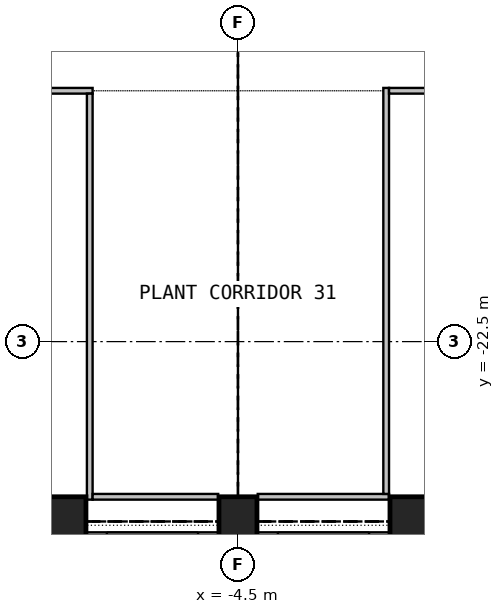
"""IFC4 building model, lengths in metres.
Left out: names, types, materials, properties, quantities, classifications, styles, units other than length and angle.
Written with IfcOpenShell. Run it as: python <this file> out.ifc"""

import sys

from ifc_helpers import new_model, si_unit, direction, frame, frame_2d, origin, origin_2d, place, context, subcontext, project, spatial, rectangle, extrude, element, fill, save


model = new_model("IFC4")
c1 = context("Model", 3, precision=1e-05, world=origin(), true_north=direction((0.0, 1.0)))
c2 = subcontext(c1, "Body", "Model", "MODEL_VIEW")
j1 = project(units=[si_unit("LENGTHUNIT", "METRE"), si_unit("PLANEANGLEUNIT", "RADIAN")], contexts=[c1])
p1 = place(None, origin())
s1 = spatial("IfcSite", under=j1, at=p1, CompositionType="ELEMENT")
p2 = place(p1, origin())
s2 = spatial("IfcBuilding", under=s1, at=p2, CompositionType="ELEMENT")
p3 = place(p2, frame((0.0, 0.0, 128.1)))
s3 = spatial("IfcBuildingStorey", under=s2, at=p3, CompositionType="ELEMENT", Elevation=128.1)
for number, where, z_axis, x_axis in (
    (1, (-9.0, -27.233, 0.0), (0.0, 0.0, 1.0), (1.0, 0.0, 0.0)),
    (2, (-4.5, -27.233, 0.0), (0.0, 0.0, 1.0), (1.0, 0.0, 0.0)),
    (3, (0.0, -27.233, 0.0), (0.0, 0.0, 1.0), (1.0, 0.0, 0.0)),
):
    element("IfcColumn", number, at=place(p3, frame(where, z_axis=z_axis, x_axis=x_axis)), inside=s3, PredefinedType="COLUMN", context=c2, shape_type="SweptSolid", body=[
        extrude(rectangle(XDim=1.0, YDim=1.3, at=origin_2d()), origin(), (0.0, 0.0, 1.0), 4.175),
    ])
p4 = place(p3, frame((-8.5, -27.578, 0.0), z_axis=(0.0, 0.0, 1.0), x_axis=(1.0, 0.0, 0.0)))
e4 = element("IfcWall", 4, at=p4, inside=s3, PredefinedType="SOLIDWALL", context=c2, shape_type="SweptSolid", body=[
    extrude(rectangle(XDim=3.499, YDim=0.12, at=frame_2d((1.75, 0.0))), origin(), (0.0, 0.0, 1.0), 4.175),
])
p5 = place(p4, frame((0.55, 0.0, 0.6)))
e5 = element("IfcOpeningElement", 5, at=p5, cuts=e4, PredefinedType="OPENING", context=c2, shape_type="SweptSolid", body=[
    extrude(rectangle(XDim=2.4, YDim=3.0, at=frame_2d((1.2, 1.5))), frame((0.0, 0.07, 0.0), z_axis=(0.0, -1.0, 0.0), x_axis=(1.0, 0.0, 0.0)), (0.0, 0.0, 1.0), 0.14),
])
p6 = place(p3, frame((-4.0, -27.578, 0.0), z_axis=(0.0, 0.0, 1.0), x_axis=(1.0, 0.0, 0.0)))
e6 = element("IfcWall", 6, at=p6, inside=s3, PredefinedType="SOLIDWALL", context=c2, shape_type="SweptSolid", body=[
    extrude(rectangle(XDim=3.499, YDim=0.12, at=frame_2d((1.75, 0.0))), origin(), (0.0, 0.0, 1.0), 4.175),
])
p7 = place(p6, frame((0.55, 0.0, 0.6)))
e7 = element("IfcOpeningElement", 7, at=p7, cuts=e6, PredefinedType="OPENING", context=c2, shape_type="SweptSolid", body=[
    extrude(rectangle(XDim=2.4, YDim=3.0, at=frame_2d((1.2, 1.5))), frame((0.0, 0.07, 0.0), z_axis=(0.0, -1.0, 0.0), x_axis=(1.0, 0.0, 0.0)), (0.0, 0.0, 1.0), 0.14),
])
p8 = place(p3, frame((-18.075, -15.9, 0.0), z_axis=(0.0, 0.0, 1.0), x_axis=(1.0, 0.0, 0.0)))
e8 = element("IfcWall", 8, at=p8, inside=s3, PredefinedType="PARTITIONING", context=c2, shape_type="SweptSolid", body=[
    extrude(rectangle(XDim=9.75, YDim=0.15, at=frame_2d((4.875, 0.0))), origin(), (0.0, 0.0, 1.0), 4.175),
])
p9 = place(p3, frame((-8.4, -26.658, 0.0), z_axis=(0.0, 0.0, 1.0), x_axis=(0.0, 1.0, 0.0)))
e9 = element("IfcWall", 9, at=p9, inside=s3, PredefinedType="PARTITIONING", context=c2, shape_type="SweptSolid", body=[
    extrude(rectangle(XDim=10.683, YDim=0.15, at=frame_2d((5.341, 0.0))), origin(), (0.0, 0.0, 1.0), 4.175),
])
p10 = place(p3, frame((-0.525, -26.583, 0.0), z_axis=(0.0, 0.0, 1.0), x_axis=(-1.0, 0.0, 0.0)))
e10 = element("IfcWall", 10, at=p10, inside=s3, PredefinedType="PARTITIONING", context=c2, shape_type="SweptSolid", body=[
    extrude(rectangle(XDim=3.455, YDim=0.15, at=frame_2d((1.728, 0.0))), origin(), (0.0, 0.0, 1.0), 4.175),
])
p11 = place(p3, frame((-5.02, -26.583, 0.0), z_axis=(0.0, 0.0, 1.0), x_axis=(-1.0, 0.0, 0.0)))
e11 = element("IfcWall", 11, at=p11, inside=s3, PredefinedType="PARTITIONING", context=c2, shape_type="SweptSolid", body=[
    extrude(rectangle(XDim=3.305, YDim=0.15, at=frame_2d((1.652, 0.0))), origin(), (0.0, 0.0, 1.0), 4.175),
])
p12 = place(p3, frame((-0.6, -15.825, 0.0), z_axis=(0.0, 0.0, 1.0), x_axis=(0.0, -1.0, 0.0)))
e12 = element("IfcWall", 12, at=p12, inside=s3, PredefinedType="PARTITIONING", context=c2, shape_type="SweptSolid", body=[
    extrude(rectangle(XDim=10.683, YDim=0.15, at=frame_2d((5.342, 0.0))), origin(), (0.0, 0.0, 1.0), 4.175),
])
p13 = place(p3, frame((-0.525, -15.9, 0.0), z_axis=(0.0, 0.0, 1.0), x_axis=(1.0, 0.0, 0.0)))
e13 = element("IfcWall", 13, at=p13, inside=s3, PredefinedType="PARTITIONING", context=c2, shape_type="SweptSolid", body=[
    extrude(rectangle(XDim=18.75, YDim=0.15, at=frame_2d((9.375, 0.0))), origin(), (0.0, 0.0, 1.0), 4.175),
])
p14 = place(p13, frame((8.875, 0.0, 0.0)))
e14 = element("IfcOpeningElement", 14, at=p14, cuts=e13, PredefinedType="OPENING", context=c2, shape_type="SweptSolid", body=[
    extrude(rectangle(XDim=1.0, YDim=2.1, at=frame_2d((0.5, 1.05))), frame((0.0, 0.085, 0.0), z_axis=(0.0, -1.0, 0.0), x_axis=(1.0, 0.0, 0.0)), (0.0, 0.0, 1.0), 0.17),
])
p15 = place(p5, origin())
e15 = element("IfcWindow", 15, at=p15, inside=s3, PartitioningType="SINGLE_PANEL", PredefinedType="WINDOW", context=c2, shape_type="SweptSolid", body=[
    extrude(rectangle(XDim=2.4, YDim=3.0, at=frame_2d((1.2, 1.5))), frame((0.0, 0.06, 0.0), z_axis=(0.0, -1.0, 0.0), x_axis=(1.0, 0.0, 0.0)), (0.0, 0.0, 1.0), 0.02),
])
fill(e5, e15)
p16 = place(p7, origin())
e16 = element("IfcWindow", 16, at=p16, inside=s3, PartitioningType="SINGLE_PANEL", PredefinedType="WINDOW", context=c2, shape_type="SweptSolid", body=[
    extrude(rectangle(XDim=2.4, YDim=3.0, at=frame_2d((1.2, 1.5))), frame((0.0, 0.06, 0.0), z_axis=(0.0, -1.0, 0.0), x_axis=(1.0, 0.0, 0.0)), (0.0, 0.0, 1.0), 0.02),
])
fill(e7, e16)
save(model, sys.argv[1])
